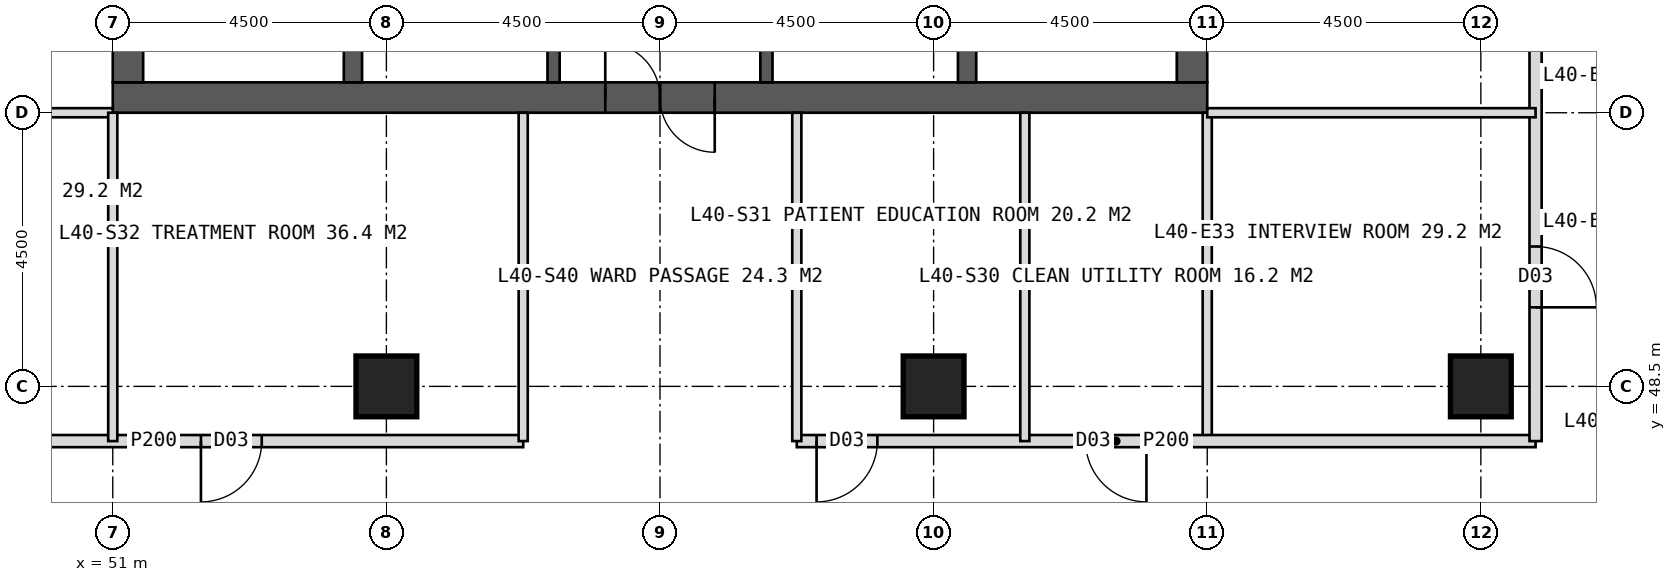
"""IFC4 building model, lengths in metres.
Left out: names, types, materials, properties, quantities, classifications, styles, units other than length and angle.
Written with IfcOpenShell. Run it as: python <this file> out.ifc"""

import sys

from ifc_helpers import new_model, si_unit, direction, frame, frame_2d, origin, origin_2d, place, context, subcontext, project, spatial, rectangle, hollow_rectangle, extrude, element, fill, save


model = new_model("IFC4")
c1 = context("Model", 3, precision=1e-05, world=origin(), true_north=direction((0.0, 1.0)))
c2 = subcontext(c1, "Body", "Model", "MODEL_VIEW")
j1 = project(units=[si_unit("LENGTHUNIT", "METRE"), si_unit("PLANEANGLEUNIT", "RADIAN")], contexts=[c1])
p1 = place(None, origin())
s1 = spatial("IfcSite", under=j1, at=p1, CompositionType="ELEMENT")
p2 = place(p1, origin())
s2 = spatial("IfcBuilding", under=s1, at=p2, CompositionType="ELEMENT")
p3 = place(p2, frame((0.0, 0.0, 168.0)))
s3 = spatial("IfcBuildingStorey", under=s2, at=p3, CompositionType="ELEMENT", Elevation=168.0)
p4 = place(p3, frame((51.0, 53.25, 0.0), z_axis=(0.0, 0.0, 1.0), x_axis=(1.0, 0.0, 0.0)))
e1 = element("IfcWall", 1, at=p4, inside=s3, PredefinedType="SHEAR", context=c2, shape_type="SweptSolid", body=[
    extrude(rectangle(XDim=18.0, YDim=0.5, at=frame_2d((9.0, 0.0))), origin(), (0.0, 0.0, 1.0), 4.0),
])
p5 = place(p4, frame((8.1, 0.0, 0.0)))
e2 = element("IfcOpeningElement", 2, at=p5, cuts=e1, PredefinedType="OPENING", context=c2, shape_type="SweptSolid", body=[
    extrude(rectangle(XDim=1.8, YDim=2.2, at=frame_2d((0.9, 1.1))), frame((0.0, 0.26, 0.0), z_axis=(0.0, -1.0, 0.0), x_axis=(1.0, 0.0, 0.0)), (0.0, 0.0, 1.0), 0.52),
])
p6 = place(p3, frame((51.25, 53.5, 0.0), z_axis=(0.0, 0.0, 1.0), x_axis=(0.0, 1.0, 0.0)))
e3 = element("IfcWall", 3, at=p6, inside=s3, PredefinedType="SHEAR", context=c2, shape_type="SweptSolid", body=[
    extrude(rectangle(XDim=17.0, YDim=0.5, at=frame_2d((8.5, 0.0))), origin(), (0.0, 0.0, 1.0), 4.0),
])
p7 = place(p6, frame((6.0, 0.0, 0.0)))
e4 = element("IfcOpeningElement", 4, at=p7, cuts=e3, PredefinedType="OPENING", context=c2, shape_type="SweptSolid", body=[
    extrude(rectangle(XDim=1.5, YDim=2.2, at=frame_2d((0.75, 1.1))), frame((0.0, 0.26, 0.0), z_axis=(0.0, -1.0, 0.0), x_axis=(1.0, 0.0, 0.0)), (0.0, 0.0, 1.0), 0.52),
])
p8 = place(p3, frame((68.75, 53.5, 0.0), z_axis=(0.0, 0.0, 1.0), x_axis=(0.0, 1.0, 0.0)))
e5 = element("IfcWall", 5, at=p8, inside=s3, PredefinedType="SHEAR", context=c2, shape_type="SweptSolid", body=[
    extrude(rectangle(XDim=17.0, YDim=0.5, at=frame_2d((8.5, 0.0))), origin(), (0.0, 0.0, 1.0), 4.0),
])
p9 = place(p8, frame((9.5, 0.0, 0.0)))
e6 = element("IfcOpeningElement", 6, at=p9, cuts=e5, PredefinedType="OPENING", context=c2, shape_type="SweptSolid", body=[
    extrude(rectangle(XDim=1.5, YDim=2.2, at=frame_2d((0.75, 1.1))), frame((0.0, 0.26, 0.0), z_axis=(0.0, -1.0, 0.0), x_axis=(1.0, 0.0, 0.0)), (0.0, 0.0, 1.0), 0.52),
])
for number, where, z_axis, x_axis in (
    (7, (54.95, 53.5, 0.0), (0.0, 0.0, 1.0), (0.0, 1.0, 0.0)),
    (8, (65.05, 53.5, 0.0), (0.0, 0.0, 1.0), (0.0, 1.0, 0.0)),
):
    element("IfcWall", number, at=place(p3, frame(where, z_axis=z_axis, x_axis=x_axis)), inside=s3, PredefinedType="SHEAR", context=c2, shape_type="SweptSolid", body=[
        extrude(rectangle(XDim=17.0, YDim=0.3, at=frame_2d((8.5, 0.0))), origin(), (0.0, 0.0, 1.0), 4.0),
    ])
p10 = place(p3, frame((58.25, 53.5, 0.0), z_axis=(0.0, 0.0, 1.0), x_axis=(0.0, 1.0, 0.0)))
e9 = element("IfcWall", 9, at=p10, inside=s3, PredefinedType="SHEAR", context=c2, shape_type="SweptSolid", body=[
    extrude(rectangle(XDim=17.0, YDim=0.2, at=frame_2d((8.5, 0.0))), origin(), (0.0, 0.0, 1.0), 4.0),
])
p11 = place(p10, frame((1.375, 0.0, 0.0)))
e10 = element("IfcOpeningElement", 10, at=p11, cuts=e9, PredefinedType="OPENING", context=c2, shape_type="SweptSolid", body=[
    extrude(rectangle(XDim=1.4, YDim=2.2, at=frame_2d((0.7, 1.1))), frame((0.0, 0.11, 0.0), z_axis=(0.0, -1.0, 0.0), x_axis=(1.0, 0.0, 0.0)), (0.0, 0.0, 1.0), 0.22),
])
p12 = place(p10, frame((5.675, 0.0, 0.0)))
e11 = element("IfcOpeningElement", 11, at=p12, cuts=e9, PredefinedType="OPENING", context=c2, shape_type="SweptSolid", body=[
    extrude(rectangle(XDim=1.4, YDim=2.2, at=frame_2d((0.7, 1.1))), frame((0.0, 0.11, 0.0), z_axis=(0.0, -1.0, 0.0), x_axis=(1.0, 0.0, 0.0)), (0.0, 0.0, 1.0), 0.22),
])
p13 = place(p10, frame((9.925, 0.0, 0.0)))
e12 = element("IfcOpeningElement", 12, at=p13, cuts=e9, PredefinedType="OPENING", context=c2, shape_type="SweptSolid", body=[
    extrude(rectangle(XDim=1.4, YDim=2.2, at=frame_2d((0.7, 1.1))), frame((0.0, 0.11, 0.0), z_axis=(0.0, -1.0, 0.0), x_axis=(1.0, 0.0, 0.0)), (0.0, 0.0, 1.0), 0.22),
])
p14 = place(p10, frame((14.225, 0.0, 0.0)))
e13 = element("IfcOpeningElement", 13, at=p14, cuts=e9, PredefinedType="OPENING", context=c2, shape_type="SweptSolid", body=[
    extrude(rectangle(XDim=1.4, YDim=2.2, at=frame_2d((0.7, 1.1))), frame((0.0, 0.11, 0.0), z_axis=(0.0, -1.0, 0.0), x_axis=(1.0, 0.0, 0.0)), (0.0, 0.0, 1.0), 0.22),
])
p15 = place(p3, frame((61.75, 53.5, 0.0), z_axis=(0.0, 0.0, 1.0), x_axis=(0.0, 1.0, 0.0)))
e14 = element("IfcWall", 14, at=p15, inside=s3, PredefinedType="SHEAR", context=c2, shape_type="SweptSolid", body=[
    extrude(rectangle(XDim=17.0, YDim=0.2, at=frame_2d((8.5, 0.0))), origin(), (0.0, 0.0, 1.0), 4.0),
])
p16 = place(p15, frame((1.375, 0.0, 0.0)))
e15 = element("IfcOpeningElement", 15, at=p16, cuts=e14, PredefinedType="OPENING", context=c2, shape_type="SweptSolid", body=[
    extrude(rectangle(XDim=1.4, YDim=2.2, at=frame_2d((0.7, 1.1))), frame((0.0, 0.11, 0.0), z_axis=(0.0, -1.0, 0.0), x_axis=(1.0, 0.0, 0.0)), (0.0, 0.0, 1.0), 0.22),
])
p17 = place(p15, frame((5.675, 0.0, 0.0)))
e16 = element("IfcOpeningElement", 16, at=p17, cuts=e14, PredefinedType="OPENING", context=c2, shape_type="SweptSolid", body=[
    extrude(rectangle(XDim=1.4, YDim=2.2, at=frame_2d((0.7, 1.1))), frame((0.0, 0.11, 0.0), z_axis=(0.0, -1.0, 0.0), x_axis=(1.0, 0.0, 0.0)), (0.0, 0.0, 1.0), 0.22),
])
p18 = place(p15, frame((9.925, 0.0, 0.0)))
e17 = element("IfcOpeningElement", 17, at=p18, cuts=e14, PredefinedType="OPENING", context=c2, shape_type="SweptSolid", body=[
    extrude(rectangle(XDim=1.4, YDim=2.2, at=frame_2d((0.7, 1.1))), frame((0.0, 0.11, 0.0), z_axis=(0.0, -1.0, 0.0), x_axis=(1.0, 0.0, 0.0)), (0.0, 0.0, 1.0), 0.22),
])
p19 = place(p15, frame((14.225, 0.0, 0.0)))
e18 = element("IfcOpeningElement", 18, at=p19, cuts=e14, PredefinedType="OPENING", context=c2, shape_type="SweptSolid", body=[
    extrude(rectangle(XDim=1.4, YDim=2.2, at=frame_2d((0.7, 1.1))), frame((0.0, 0.11, 0.0), z_axis=(0.0, -1.0, 0.0), x_axis=(1.0, 0.0, 0.0)), (0.0, 0.0, 1.0), 0.22),
])
for number, where, z_axis, x_axis in (
    (19, (73.5, 48.5, 0.0), (0.0, 0.0, 1.0), (1.0, 0.0, 0.0)),
    (20, (55.5, 48.5, 0.0), (0.0, 0.0, 1.0), (1.0, 0.0, 0.0)),
    (21, (64.5, 48.5, 0.0), (0.0, 0.0, 1.0), (1.0, 0.0, 0.0)),
):
    element("IfcColumn", number, at=place(p3, frame(where, z_axis=z_axis, x_axis=x_axis)), inside=s3, PredefinedType="COLUMN", context=c2, shape_type="SweptSolid", body=[
        extrude(hollow_rectangle(XDim=1.0, YDim=1.0, WallThickness=0.1, at=origin_2d()), origin(), (0.0, 0.0, 1.0), 4.0),
    ])
for number, where, z_axis, x_axis in (
    (22, (51.0, 53.0, 0.0), (0.0, 0.0, 1.0), (-1.0, 0.0, 0.0)),
    (23, (69.0, 53.0, 0.0), (0.0, 0.0, 1.0), (0.0, -1.0, 0.0)),
):
    element("IfcWall", number, at=place(p3, frame(where, z_axis=z_axis, x_axis=x_axis)), inside=s3, PredefinedType="PARTITIONING", context=c2, shape_type="SweptSolid", body=[
        extrude(rectangle(XDim=5.4, YDim=0.15, at=frame_2d((2.7, 0.0))), origin(), (0.0, 0.0, 1.0), 3.75),
    ])
p20 = place(p3, frame((74.4, 47.6, 0.0), z_axis=(0.0, 0.0, 1.0), x_axis=(-1.0, 0.0, 0.0)))
e24 = element("IfcWall", 24, at=p20, inside=s3, PredefinedType="PARTITIONING", context=c2, shape_type="SweptSolid", body=[
    extrude(rectangle(XDim=12.15, YDim=0.2, at=frame_2d((6.075, 0.0))), origin(), (0.0, 0.0, 1.0), 3.75),
])
p21 = place(p20, frame((6.4, 0.0, 0.0)))
e25 = element("IfcOpeningElement", 25, at=p21, cuts=e24, PredefinedType="OPENING", context=c2, shape_type="SweptSolid", body=[
    extrude(rectangle(XDim=1.0, YDim=2.1, at=frame_2d((0.5, 1.05))), frame((0.0, 0.11, 0.0), z_axis=(0.0, -1.0, 0.0), x_axis=(1.0, 0.0, 0.0)), (0.0, 0.0, 1.0), 0.22),
])
p22 = place(p20, frame((10.825, 0.0, 0.0)))
e26 = element("IfcOpeningElement", 26, at=p22, cuts=e24, PredefinedType="OPENING", context=c2, shape_type="SweptSolid", body=[
    extrude(rectangle(XDim=1.0, YDim=2.1, at=frame_2d((0.5, 1.05))), frame((0.0, 0.11, 0.0), z_axis=(0.0, -1.0, 0.0), x_axis=(1.0, 0.0, 0.0)), (0.0, 0.0, 1.0), 0.22),
])
p23 = place(p3, frame((57.75, 47.6, 0.0), z_axis=(0.0, 0.0, 1.0), x_axis=(-1.0, 0.0, 0.0)))
e27 = element("IfcWall", 27, at=p23, inside=s3, PredefinedType="PARTITIONING", context=c2, shape_type="SweptSolid", body=[
    extrude(rectangle(XDim=12.15, YDim=0.2, at=frame_2d((6.075, 0.0))), origin(), (0.0, 0.0, 1.0), 3.75),
])
p24 = place(p23, frame((4.3, 0.0, 0.0)))
e28 = element("IfcOpeningElement", 28, at=p24, cuts=e27, PredefinedType="OPENING", context=c2, shape_type="SweptSolid", body=[
    extrude(rectangle(XDim=1.0, YDim=2.1, at=frame_2d((0.5, 1.05))), frame((0.0, 0.11, 0.0), z_axis=(0.0, -1.0, 0.0), x_axis=(1.0, 0.0, 0.0)), (0.0, 0.0, 1.0), 0.22),
])
p25 = place(p23, frame((8.95, 0.0, 0.0)))
e29 = element("IfcOpeningElement", 29, at=p25, cuts=e27, PredefinedType="OPENING", context=c2, shape_type="SweptSolid", body=[
    extrude(rectangle(XDim=1.0, YDim=2.1, at=frame_2d((0.5, 1.05))), frame((0.0, 0.11, 0.0), z_axis=(0.0, -1.0, 0.0), x_axis=(1.0, 0.0, 0.0)), (0.0, 0.0, 1.0), 0.22),
])
for number, where, z_axis, x_axis in (
    (30, (62.25, 53.0, 0.0), (0.0, 0.0, 1.0), (0.0, -1.0, 0.0)),
    (31, (57.75, 53.0, 0.0), (0.0, 0.0, 1.0), (0.0, -1.0, 0.0)),
    (32, (66.0, 53.0, 0.0), (0.0, 0.0, 1.0), (0.0, -1.0, 0.0)),
    (33, (51.0, 53.0, 0.0), (0.0, 0.0, 1.0), (0.0, -1.0, 0.0)),
):
    element("IfcWall", number, at=place(p3, frame(where, z_axis=z_axis, x_axis=x_axis)), inside=s3, PredefinedType="PARTITIONING", context=c2, shape_type="SweptSolid", body=[
        extrude(rectangle(XDim=5.4, YDim=0.15, at=frame_2d((2.7, 0.0))), origin(), (0.0, 0.0, 1.0), 3.75),
    ])
p26 = place(p3, frame((74.4, 62.0, 0.0), z_axis=(0.0, 0.0, 1.0), x_axis=(0.0, -1.0, 0.0)))
e34 = element("IfcWall", 34, at=p26, inside=s3, PredefinedType="PARTITIONING", context=c2, shape_type="SweptSolid", body=[
    extrude(rectangle(XDim=14.4, YDim=0.2, at=frame_2d((7.2, 0.0))), origin(), (0.0, 0.0, 1.0), 3.75),
])
p27 = place(p26, frame((1.45, 0.0, 0.0)))
e35 = element("IfcOpeningElement", 35, at=p27, cuts=e34, PredefinedType="OPENING", context=c2, shape_type="SweptSolid", body=[
    extrude(rectangle(XDim=1.0, YDim=2.1, at=frame_2d((0.5, 1.05))), frame((0.0, 0.11, 0.0), z_axis=(0.0, -1.0, 0.0), x_axis=(1.0, 0.0, 0.0)), (0.0, 0.0, 1.0), 0.22),
])
p28 = place(p26, frame((11.2, 0.0, 0.0)))
e36 = element("IfcOpeningElement", 36, at=p28, cuts=e34, PredefinedType="OPENING", context=c2, shape_type="SweptSolid", body=[
    extrude(rectangle(XDim=1.0, YDim=2.1, at=frame_2d((0.5, 1.05))), frame((0.0, 0.11, 0.0), z_axis=(0.0, -1.0, 0.0), x_axis=(1.0, 0.0, 0.0)), (0.0, 0.0, 1.0), 0.22),
])
p29 = place(p3, frame((69.0, 53.0, 0.0), z_axis=(0.0, 0.0, 1.0), x_axis=(1.0, 0.0, 0.0)))
e37 = element("IfcWall", 37, at=p29, inside=s3, PredefinedType="PARTITIONING", context=c2, shape_type="SweptSolid", body=[
    extrude(rectangle(XDim=5.4, YDim=0.15, at=frame_2d((2.7, 0.0))), origin(), (0.0, 0.0, 1.0), 3.75),
])
p30 = place(p21, origin())
e38 = element("IfcDoor", 38, at=p30, inside=s3, OperationType="SINGLE_SWING_LEFT", PredefinedType="DOOR", context=c2, shape_type="SweptSolid", body=[
    extrude(rectangle(XDim=1.0, YDim=2.1, at=frame_2d((0.5, 1.05))), frame((0.0, 0.025, 0.0), z_axis=(0.0, -1.0, 0.0), x_axis=(1.0, 0.0, 0.0)), (0.0, 0.0, 1.0), 0.05),
])
fill(e25, e38)
p31 = place(p22, origin())
e39 = element("IfcDoor", 39, at=p31, inside=s3, OperationType="SINGLE_SWING_RIGHT", PredefinedType="DOOR", context=c2, shape_type="SweptSolid", body=[
    extrude(rectangle(XDim=1.0, YDim=2.1, at=frame_2d((0.5, 1.05))), frame((0.0, 0.025, 0.0), z_axis=(0.0, -1.0, 0.0), x_axis=(1.0, 0.0, 0.0)), (0.0, 0.0, 1.0), 0.05),
])
fill(e26, e39)
p32 = place(p24, origin())
e40 = element("IfcDoor", 40, at=p32, inside=s3, OperationType="SINGLE_SWING_RIGHT", PredefinedType="DOOR", context=c2, shape_type="SweptSolid", body=[
    extrude(rectangle(XDim=1.0, YDim=2.1, at=frame_2d((0.5, 1.05))), frame((0.0, 0.025, 0.0), z_axis=(0.0, -1.0, 0.0), x_axis=(1.0, 0.0, 0.0)), (0.0, 0.0, 1.0), 0.05),
])
fill(e28, e40)
p33 = place(p28, origin())
e41 = element("IfcDoor", 41, at=p33, inside=s3, OperationType="SINGLE_SWING_RIGHT", PredefinedType="DOOR", context=c2, shape_type="SweptSolid", body=[
    extrude(rectangle(XDim=1.0, YDim=2.1, at=frame_2d((0.5, 1.05))), frame((0.0, 0.025, 0.0), z_axis=(0.0, -1.0, 0.0), x_axis=(1.0, 0.0, 0.0)), (0.0, 0.0, 1.0), 0.05),
])
fill(e36, e41)
p34 = place(p5, origin())
e42 = element("IfcDoor", 42, at=p34, inside=s3, OperationType="DOUBLE_DOOR_SINGLE_SWING", PredefinedType="DOOR", context=c2, shape_type="SweptSolid", body=[
    extrude(rectangle(XDim=1.8, YDim=2.2, at=frame_2d((0.9, 1.1))), frame((0.0, 0.025, 0.0), z_axis=(0.0, -1.0, 0.0), x_axis=(1.0, 0.0, 0.0)), (0.0, 0.0, 1.0), 0.05),
])
fill(e2, e42)
save(model, sys.argv[1])
